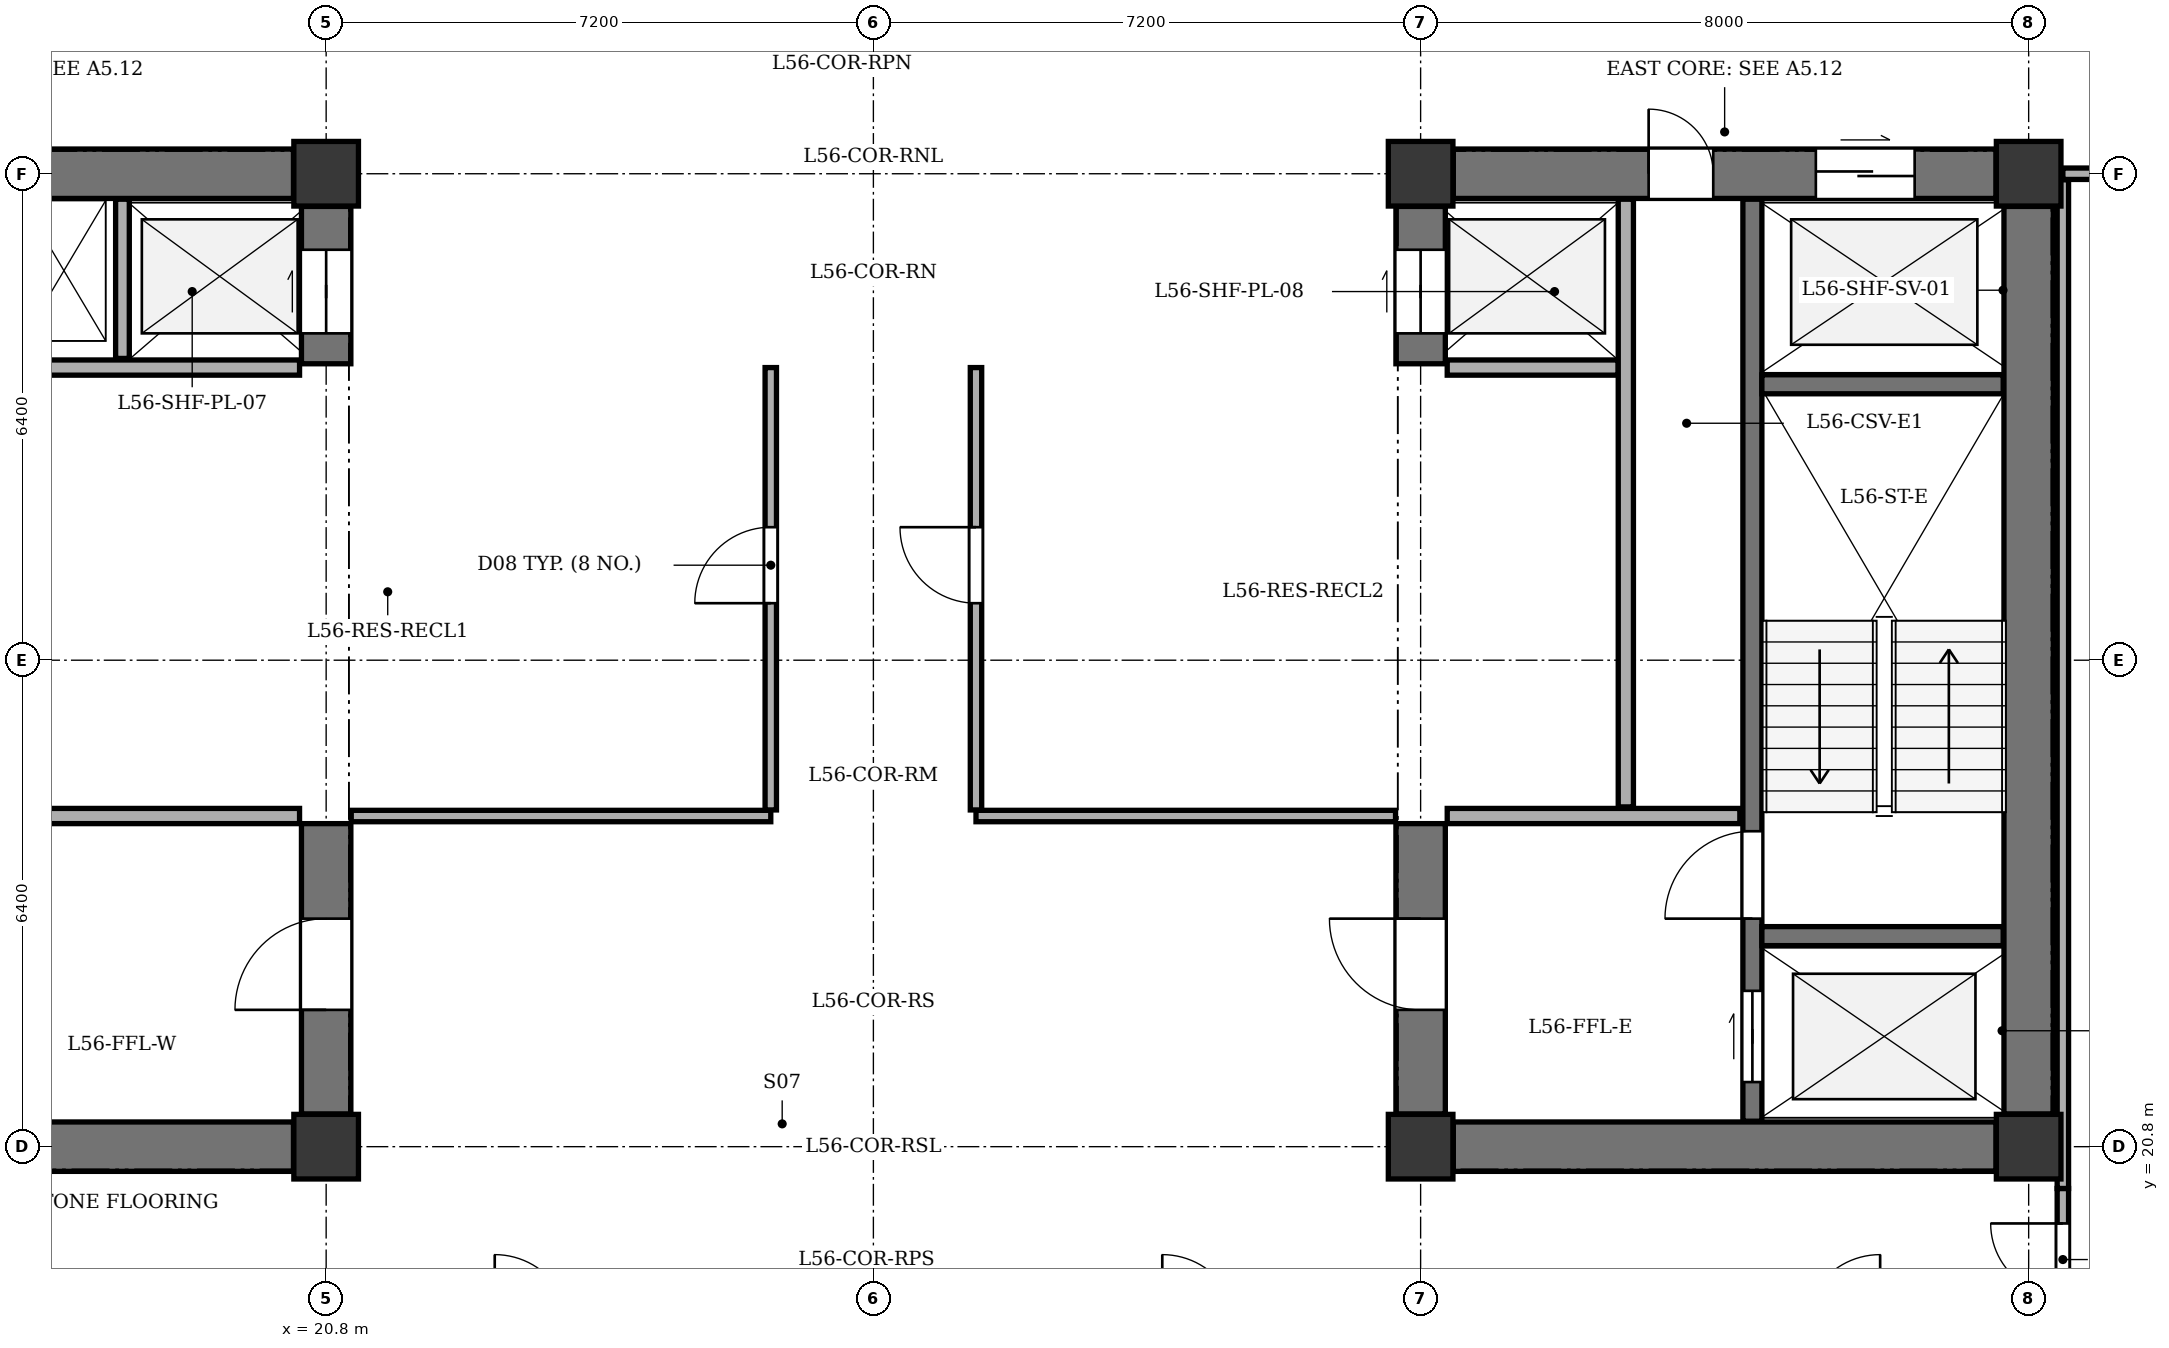
"""IFC4 building model, lengths in metres.
Left out: names, types, materials, properties, quantities, classifications, styles, units other than length and angle.
Written with IfcOpenShell. Run it as: python <this file> out.ifc"""

import sys

from ifc_helpers import new_model, si_unit, direction, frame, frame_2d, origin, origin_2d, place, context, subcontext, project, spatial, rectangle, extrude, element, fill, save


model = new_model("IFC4")
c1 = context("Model", 3, precision=1e-05, world=origin(), true_north=direction((0.0, 1.0)))
c2 = subcontext(c1, "Body", "Model", "MODEL_VIEW")
j1 = project(units=[si_unit("LENGTHUNIT", "METRE"), si_unit("PLANEANGLEUNIT", "RADIAN")], contexts=[c1])
p1 = place(None, origin())
s1 = spatial("IfcSite", under=j1, at=p1, CompositionType="ELEMENT")
p2 = place(p1, origin())
s2 = spatial("IfcBuilding", under=s1, at=p2, CompositionType="ELEMENT")
p3 = place(p2, frame((0.0, 0.0, 217.7)))
s3 = spatial("IfcBuildingStorey", under=s2, at=p3, CompositionType="ELEMENT", Elevation=217.7)
for number, where, z_axis, x_axis in (
    (1, (20.8, 20.8, 0.0), (0.0, 0.0, 1.0), (1.0, 0.0, 0.0)),
    (2, (20.8, 33.6, 0.0), (0.0, 0.0, 1.0), (1.0, 0.0, 0.0)),
    (3, (35.2, 20.8, 0.0), (0.0, 0.0, 1.0), (1.0, 0.0, 0.0)),
    (4, (43.2, 20.8, 0.0), (0.0, 0.0, 1.0), (1.0, 0.0, 0.0)),
    (5, (35.2, 33.6, 0.0), (0.0, 0.0, 1.0), (1.0, 0.0, 0.0)),
    (6, (43.2, 33.6, 0.0), (0.0, 0.0, 1.0), (1.0, 0.0, 0.0)),
):
    element("IfcColumn", number, at=place(p3, frame(where, z_axis=z_axis, x_axis=x_axis)), inside=s3, PredefinedType="COLUMN", context=c2, shape_type="SweptSolid", body=[
        extrude(rectangle(XDim=0.85, YDim=0.85, at=origin_2d()), origin(), (0.0, 0.0, 1.0), 3.4),
    ])
p4 = place(p3, frame((13.23, 20.8, 0.0), z_axis=(0.0, 0.0, 1.0), x_axis=(1.0, 0.0, 0.0)))
e7 = element("IfcWall", 7, at=p4, inside=s3, PredefinedType="SHEAR", context=c2, shape_type="SweptSolid", body=[
    extrude(rectangle(XDim=7.14, YDim=0.65, at=frame_2d((3.57, 0.0))), origin(), (0.0, 0.0, 1.0), 3.1),
])
p5 = place(p3, frame((13.23, 33.6, 0.0), z_axis=(0.0, 0.0, 1.0), x_axis=(1.0, 0.0, 0.0)))
e8 = element("IfcWall", 8, at=p5, inside=s3, PredefinedType="SHEAR", context=c2, shape_type="SweptSolid", body=[
    extrude(rectangle(XDim=7.14, YDim=0.65, at=frame_2d((3.57, 0.0))), origin(), (0.0, 0.0, 1.0), 3.1),
])
p6 = place(p5, frame((1.17, 0.0, 0.0)))
e9 = element("IfcOpeningElement", 9, at=p6, cuts=e8, PredefinedType="OPENING", context=c2, shape_type="SweptSolid", body=[
    extrude(rectangle(XDim=0.85, YDim=2.02, at=frame_2d((0.425, 1.01))), frame((0.0, 0.335, 0.0), z_axis=(0.0, -1.0, 0.0), x_axis=(1.0, 0.0, 0.0)), (0.0, 0.0, 1.0), 0.67),
])
p7 = place(p3, frame((20.8, 21.23, 0.0), z_axis=(0.0, 0.0, 1.0), x_axis=(0.0, 1.0, 0.0)))
e10 = element("IfcWall", 10, at=p7, inside=s3, PredefinedType="SHEAR", context=c2, shape_type="SweptSolid", body=[
    extrude(rectangle(XDim=3.82, YDim=0.65, at=frame_2d((1.91, 0.0))), origin(), (0.0, 0.0, 1.0), 3.1),
])
p8 = place(p7, frame((1.37, 0.0, 0.0)))
e11 = element("IfcOpeningElement", 11, at=p8, cuts=e10, PredefinedType="OPENING", context=c2, shape_type="SweptSolid", body=[
    extrude(rectangle(XDim=1.2, YDim=2.15, at=frame_2d((0.6, 1.075))), frame((0.0, 0.335, 0.0), z_axis=(0.0, -1.0, 0.0), x_axis=(1.0, 0.0, 0.0)), (0.0, 0.0, 1.0), 0.67),
])
p9 = place(p3, frame((20.8, 31.1, 0.0), z_axis=(0.0, 0.0, 1.0), x_axis=(0.0, 1.0, 0.0)))
e12 = element("IfcWall", 12, at=p9, inside=s3, PredefinedType="SHEAR", context=c2, shape_type="SweptSolid", body=[
    extrude(rectangle(XDim=2.07, YDim=0.65, at=frame_2d((1.035, 0.0))), origin(), (0.0, 0.0, 1.0), 3.1),
])
p10 = place(p9, frame((0.4, 0.0, 0.0)))
e13 = element("IfcOpeningElement", 13, at=p10, cuts=e12, PredefinedType="OPENING", context=c2, shape_type="SweptSolid", body=[
    extrude(rectangle(XDim=1.1, YDim=2.1, at=frame_2d((0.55, 1.05))), frame((0.0, 0.335, 0.0), z_axis=(0.0, -1.0, 0.0), x_axis=(1.0, 0.0, 0.0)), (0.0, 0.0, 1.0), 0.67),
])
for number, where, z_axis, x_axis in (
    (14, (16.6, 25.15, 0.0), (0.0, 0.0, 1.0), (1.0, 0.0, 0.0)),
    (15, (16.6, 31.05, 0.0), (0.0, 0.0, 1.0), (1.0, 0.0, 0.0)),
):
    element("IfcWall", number, at=place(p3, frame(where, z_axis=z_axis, x_axis=x_axis)), inside=s3, PredefinedType="SOLIDWALL", context=c2, shape_type="SweptSolid", body=[
        extrude(rectangle(XDim=3.85, YDim=0.2, at=frame_2d((1.925, 0.0))), origin(), (0.0, 0.0, 1.0), 3.1),
    ])
p11 = place(p3, frame((18.12, 31.17, 0.0), z_axis=(0.0, 0.0, 1.0), x_axis=(0.0, 1.0, 0.0)))
e16 = element("IfcWall", 16, at=p11, inside=s3, PredefinedType="PARTITIONING", context=c2, shape_type="SweptSolid", body=[
    extrude(rectangle(XDim=2.095, YDim=0.18, at=frame_2d((1.047, 0.0))), origin(), (0.0, 0.0, 1.0), 3.1),
])
p12 = place(p3, frame((43.2, 21.23, 0.0), z_axis=(0.0, 0.0, 1.0), x_axis=(0.0, 1.0, 0.0)))
e17 = element("IfcWall", 17, at=p12, inside=s3, PredefinedType="SHEAR", context=c2, shape_type="SweptSolid", body=[
    extrude(rectangle(XDim=11.94, YDim=0.65, at=frame_2d((5.97, 0.0))), origin(), (0.0, 0.0, 1.0), 3.1),
])
p13 = place(p3, frame((35.63, 20.8, 0.0), z_axis=(0.0, 0.0, 1.0), x_axis=(1.0, 0.0, 0.0)))
e18 = element("IfcWall", 18, at=p13, inside=s3, PredefinedType="SHEAR", context=c2, shape_type="SweptSolid", body=[
    extrude(rectangle(XDim=7.14, YDim=0.65, at=frame_2d((3.57, 0.0))), origin(), (0.0, 0.0, 1.0), 3.1),
])
p14 = place(p3, frame((35.63, 33.6, 0.0), z_axis=(0.0, 0.0, 1.0), x_axis=(1.0, 0.0, 0.0)))
e19 = element("IfcWall", 19, at=p14, inside=s3, PredefinedType="SHEAR", context=c2, shape_type="SweptSolid", body=[
    extrude(rectangle(XDim=7.14, YDim=0.65, at=frame_2d((3.57, 0.0))), origin(), (0.0, 0.0, 1.0), 3.1),
])
p15 = place(p14, frame((4.77, 0.0, 0.0)))
e20 = element("IfcOpeningElement", 20, at=p15, cuts=e19, PredefinedType="OPENING", context=c2, shape_type="SweptSolid", body=[
    extrude(rectangle(XDim=1.3, YDim=2.15, at=frame_2d((0.65, 1.075))), frame((0.0, 0.335, 0.0), z_axis=(0.0, -1.0, 0.0), x_axis=(1.0, 0.0, 0.0)), (0.0, 0.0, 1.0), 0.67),
])
p16 = place(p14, frame((2.57, 0.0, 0.0)))
e21 = element("IfcOpeningElement", 21, at=p16, cuts=e19, PredefinedType="OPENING", context=c2, shape_type="SweptSolid", body=[
    extrude(rectangle(XDim=0.85, YDim=2.02, at=frame_2d((0.425, 1.01))), frame((0.0, 0.335, 0.0), z_axis=(0.0, -1.0, 0.0), x_axis=(1.0, 0.0, 0.0)), (0.0, 0.0, 1.0), 0.67),
])
p17 = place(p3, frame((35.2, 21.23, 0.0), z_axis=(0.0, 0.0, 1.0), x_axis=(0.0, 1.0, 0.0)))
e22 = element("IfcWall", 22, at=p17, inside=s3, PredefinedType="SHEAR", context=c2, shape_type="SweptSolid", body=[
    extrude(rectangle(XDim=3.82, YDim=0.65, at=frame_2d((1.91, 0.0))), origin(), (0.0, 0.0, 1.0), 3.1),
])
p18 = place(p17, frame((1.37, 0.0, 0.0)))
e23 = element("IfcOpeningElement", 23, at=p18, cuts=e22, PredefinedType="OPENING", context=c2, shape_type="SweptSolid", body=[
    extrude(rectangle(XDim=1.2, YDim=2.15, at=frame_2d((0.6, 1.075))), frame((0.0, 0.335, 0.0), z_axis=(0.0, -1.0, 0.0), x_axis=(1.0, 0.0, 0.0)), (0.0, 0.0, 1.0), 0.67),
])
p19 = place(p3, frame((35.2, 31.1, 0.0), z_axis=(0.0, 0.0, 1.0), x_axis=(0.0, 1.0, 0.0)))
e24 = element("IfcWall", 24, at=p19, inside=s3, PredefinedType="SHEAR", context=c2, shape_type="SweptSolid", body=[
    extrude(rectangle(XDim=2.07, YDim=0.65, at=frame_2d((1.035, 0.0))), origin(), (0.0, 0.0, 1.0), 3.1),
])
p20 = place(p19, frame((0.4, 0.0, 0.0)))
e25 = element("IfcOpeningElement", 25, at=p20, cuts=e24, PredefinedType="OPENING", context=c2, shape_type="SweptSolid", body=[
    extrude(rectangle(XDim=1.1, YDim=2.1, at=frame_2d((0.55, 1.05))), frame((0.0, 0.335, 0.0), z_axis=(0.0, -1.0, 0.0), x_axis=(1.0, 0.0, 0.0)), (0.0, 0.0, 1.0), 0.67),
])
p21 = place(p3, frame((39.565, 21.135, 0.0), z_axis=(0.0, 0.0, 1.0), x_axis=(0.0, 1.0, 0.0)))
e26 = element("IfcWall", 26, at=p21, inside=s3, PredefinedType="SHEAR", context=c2, shape_type="SweptSolid", body=[
    extrude(rectangle(XDim=12.13, YDim=0.25, at=frame_2d((6.065, 0.0))), origin(), (0.0, 0.0, 1.0), 3.1),
])
p22 = place(p21, frame((0.515, 0.0, 0.0)))
e27 = element("IfcOpeningElement", 27, at=p22, cuts=e26, PredefinedType="OPENING", context=c2, shape_type="SweptSolid", body=[
    extrude(rectangle(XDim=1.2, YDim=2.15, at=frame_2d((0.6, 1.075))), frame((0.0, 0.135, 0.0), z_axis=(0.0, -1.0, 0.0), x_axis=(1.0, 0.0, 0.0)), (0.0, 0.0, 1.0), 0.27),
])
p23 = place(p21, frame((2.665, 0.0, 0.0)))
e28 = element("IfcOpeningElement", 28, at=p23, cuts=e26, PredefinedType="OPENING", context=c2, shape_type="SweptSolid", body=[
    extrude(rectangle(XDim=1.15, YDim=2.15, at=frame_2d((0.575, 1.075))), frame((0.0, 0.135, 0.0), z_axis=(0.0, -1.0, 0.0), x_axis=(1.0, 0.0, 0.0)), (0.0, 0.0, 1.0), 0.27),
])
for number, where, z_axis, x_axis in (
    (29, (39.69, 23.57, 0.0), (0.0, 0.0, 1.0), (1.0, 0.0, 0.0)),
    (30, (39.69, 30.83, 0.0), (0.0, 0.0, 1.0), (1.0, 0.0, 0.0)),
):
    element("IfcWall", number, at=place(p3, frame(where, z_axis=z_axis, x_axis=x_axis)), inside=s3, PredefinedType="SHEAR", context=c2, shape_type="SweptSolid", body=[
        extrude(rectangle(XDim=3.175, YDim=0.25, at=frame_2d((1.587, 0.0))), origin(), (0.0, 0.0, 1.0), 3.1),
    ])
p24 = place(p3, frame((35.55, 25.15, 0.0), z_axis=(0.0, 0.0, 1.0), x_axis=(1.0, 0.0, 0.0)))
e31 = element("IfcWall", 31, at=p24, inside=s3, PredefinedType="SOLIDWALL", context=c2, shape_type="SweptSolid", body=[
    extrude(rectangle(XDim=3.85, YDim=0.2, at=frame_2d((1.925, 0.0))), origin(), (0.0, 0.0, 1.0), 3.1),
])
p25 = place(p3, frame((35.55, 31.05, 0.0), z_axis=(0.0, 0.0, 1.0), x_axis=(1.0, 0.0, 0.0)))
e32 = element("IfcWall", 32, at=p25, inside=s3, PredefinedType="SOLIDWALL", context=c2, shape_type="SweptSolid", body=[
    extrude(rectangle(XDim=2.25, YDim=0.2, at=frame_2d((1.125, 0.0))), origin(), (0.0, 0.0, 1.0), 3.1),
])
p26 = place(p3, frame((37.9, 25.27, 0.0), z_axis=(0.0, 0.0, 1.0), x_axis=(0.0, 1.0, 0.0)))
e33 = element("IfcWall", 33, at=p26, inside=s3, PredefinedType="SOLIDWALL", context=c2, shape_type="SweptSolid", body=[
    extrude(rectangle(XDim=7.995, YDim=0.2, at=frame_2d((3.998, 0.0))), origin(), (0.0, 0.0, 1.0), 3.1),
])
for number, where, z_axis, x_axis in (
    (34, (21.13, 25.15, 0.0), (0.0, 0.0, 1.0), (1.0, 0.0, 0.0)),
    (35, (29.35, 25.15, 0.0), (0.0, 0.0, 1.0), (1.0, 0.0, 0.0)),
):
    element("IfcWall", number, at=place(p3, frame(where, z_axis=z_axis, x_axis=x_axis)), inside=s3, PredefinedType="PARTITIONING", context=c2, shape_type="SweptSolid", body=[
        extrude(rectangle(XDim=5.52, YDim=0.15, at=frame_2d((2.76, 0.0))), origin(), (0.0, 0.0, 1.0), 3.1),
    ])
p27 = place(p3, frame((26.65, 25.23, 0.0), z_axis=(0.0, 0.0, 1.0), x_axis=(0.0, 1.0, 0.0)))
e36 = element("IfcWall", 36, at=p27, inside=s3, PredefinedType="PARTITIONING", context=c2, shape_type="SweptSolid", body=[
    extrude(rectangle(XDim=5.82, YDim=0.15, at=frame_2d((2.91, 0.0))), origin(), (0.0, 0.0, 1.0), 3.1),
])
p28 = place(p27, frame((2.72, 0.0, 0.0)))
e37 = element("IfcOpeningElement", 37, at=p28, cuts=e36, PredefinedType="OPENING", context=c2, shape_type="SweptSolid", body=[
    extrude(rectangle(XDim=1.0, YDim=2.1, at=frame_2d((0.5, 1.05))), frame((0.0, 0.085, 0.0), z_axis=(0.0, -1.0, 0.0), x_axis=(1.0, 0.0, 0.0)), (0.0, 0.0, 1.0), 0.17),
])
p29 = place(p3, frame((29.35, 25.23, 0.0), z_axis=(0.0, 0.0, 1.0), x_axis=(0.0, 1.0, 0.0)))
e38 = element("IfcWall", 38, at=p29, inside=s3, PredefinedType="PARTITIONING", context=c2, shape_type="SweptSolid", body=[
    extrude(rectangle(XDim=5.82, YDim=0.15, at=frame_2d((2.91, 0.0))), origin(), (0.0, 0.0, 1.0), 3.1),
])
p30 = place(p29, frame((2.72, 0.0, 0.0)))
e39 = element("IfcOpeningElement", 39, at=p30, cuts=e38, PredefinedType="OPENING", context=c2, shape_type="SweptSolid", body=[
    extrude(rectangle(XDim=1.0, YDim=2.1, at=frame_2d((0.5, 1.05))), frame((0.0, 0.085, 0.0), z_axis=(0.0, -1.0, 0.0), x_axis=(1.0, 0.0, 0.0)), (0.0, 0.0, 1.0), 0.17),
])
p31 = place(p3, frame((43.65, 33.6, 0.0), z_axis=(0.0, 0.0, 1.0), x_axis=(1.0, 0.0, 0.0)))
e40 = element("IfcWall", 40, at=p31, inside=s3, PredefinedType="PARTITIONING", context=c2, shape_type="SweptSolid", body=[
    extrude(rectangle(XDim=5.305, YDim=0.15, at=frame_2d((2.653, 0.0))), origin(), (0.0, 0.0, 1.0), 2.535),
])
p32 = place(p3, frame((43.65, 18.46, 0.0), z_axis=(0.0, 0.0, 1.0), x_axis=(0.0, 1.0, 0.0)))
e41 = element("IfcWall", 41, at=p32, inside=s3, PredefinedType="PARTITIONING", context=c2, shape_type="SweptSolid", body=[
    extrude(rectangle(XDim=1.79, YDim=0.15, at=frame_2d((0.895, 0.0))), origin(), (0.0, 0.0, 1.0), 3.1),
])
p33 = place(p32, frame((0.38, 0.0, 0.0)))
e42 = element("IfcOpeningElement", 42, at=p33, cuts=e41, PredefinedType="OPENING", context=c2, shape_type="SweptSolid", body=[
    extrude(rectangle(XDim=0.95, YDim=2.1, at=frame_2d((0.475, 1.05))), frame((0.0, 0.085, 0.0), z_axis=(0.0, -1.0, 0.0), x_axis=(1.0, 0.0, 0.0)), (0.0, 0.0, 1.0), 0.17),
])
p34 = place(p3, frame((43.65, 20.25, 0.0), z_axis=(0.0, 0.0, 1.0), x_axis=(0.0, 1.0, 0.0)))
e43 = element("IfcWall", 43, at=p34, inside=s3, PredefinedType="PARTITIONING", context=c2, shape_type="SweptSolid", body=[
    extrude(rectangle(XDim=13.27, YDim=0.15, at=frame_2d((6.635, 0.0))), origin(), (0.0, 0.0, 1.0), 3.1),
])
p35 = place(p8, origin())
e44 = element("IfcDoor", 44, at=p35, inside=s3, OperationType="SINGLE_SWING_LEFT", PredefinedType="DOOR", context=c2, shape_type="SweptSolid", body=[
    extrude(rectangle(XDim=1.2, YDim=2.15, at=frame_2d((0.6, 1.075))), frame((0.0, 0.025, 0.0), z_axis=(0.0, -1.0, 0.0), x_axis=(1.0, 0.0, 0.0)), (0.0, 0.0, 1.0), 0.05),
])
fill(e11, e44)
p36 = place(p10, origin())
e45 = element("IfcDoor", 45, at=p36, inside=s3, OperationType="DOUBLE_DOOR_SLIDING", PredefinedType="DOOR", context=c2, shape_type="SweptSolid", body=[
    extrude(rectangle(XDim=1.1, YDim=2.1, at=frame_2d((0.55, 1.05))), frame((0.0, 0.025, 0.0), z_axis=(0.0, -1.0, 0.0), x_axis=(1.0, 0.0, 0.0)), (0.0, 0.0, 1.0), 0.05),
])
fill(e13, e45)
p37 = place(p15, origin())
e46 = element("IfcDoor", 46, at=p37, inside=s3, OperationType="DOUBLE_DOOR_SLIDING", PredefinedType="DOOR", context=c2, shape_type="SweptSolid", body=[
    extrude(rectangle(XDim=1.3, YDim=2.15, at=frame_2d((0.65, 1.075))), frame((0.0, 0.025, 0.0), z_axis=(0.0, -1.0, 0.0), x_axis=(1.0, 0.0, 0.0)), (0.0, 0.0, 1.0), 0.05),
])
fill(e20, e46)
p38 = place(p16, origin())
e47 = element("IfcDoor", 47, at=p38, inside=s3, OperationType="SINGLE_SWING_LEFT", PredefinedType="DOOR", context=c2, shape_type="SweptSolid", body=[
    extrude(rectangle(XDim=0.85, YDim=2.02, at=frame_2d((0.425, 1.01))), frame((0.0, 0.025, 0.0), z_axis=(0.0, -1.0, 0.0), x_axis=(1.0, 0.0, 0.0)), (0.0, 0.0, 1.0), 0.05),
])
fill(e21, e47)
p39 = place(p18, origin())
e48 = element("IfcDoor", 48, at=p39, inside=s3, OperationType="SINGLE_SWING_RIGHT", PredefinedType="DOOR", context=c2, shape_type="SweptSolid", body=[
    extrude(rectangle(XDim=1.2, YDim=2.15, at=frame_2d((0.6, 1.075))), frame((0.0, 0.025, 0.0), z_axis=(0.0, -1.0, 0.0), x_axis=(1.0, 0.0, 0.0)), (0.0, 0.0, 1.0), 0.05),
])
fill(e23, e48)
p40 = place(p20, origin())
e49 = element("IfcDoor", 49, at=p40, inside=s3, OperationType="DOUBLE_DOOR_SLIDING", PredefinedType="DOOR", context=c2, shape_type="SweptSolid", body=[
    extrude(rectangle(XDim=1.1, YDim=2.1, at=frame_2d((0.55, 1.05))), frame((0.0, 0.025, 0.0), z_axis=(0.0, -1.0, 0.0), x_axis=(1.0, 0.0, 0.0)), (0.0, 0.0, 1.0), 0.05),
])
fill(e25, e49)
p41 = place(p22, origin())
e50 = element("IfcDoor", 50, at=p41, inside=s3, OperationType="DOUBLE_DOOR_SLIDING", PredefinedType="DOOR", context=c2, shape_type="SweptSolid", body=[
    extrude(rectangle(XDim=1.2, YDim=2.15, at=frame_2d((0.6, 1.075))), frame((0.0, 0.025, 0.0), z_axis=(0.0, -1.0, 0.0), x_axis=(1.0, 0.0, 0.0)), (0.0, 0.0, 1.0), 0.05),
])
fill(e27, e50)
p42 = place(p23, origin())
e51 = element("IfcDoor", 51, at=p42, inside=s3, OperationType="SINGLE_SWING_LEFT", PredefinedType="DOOR", context=c2, shape_type="SweptSolid", body=[
    extrude(rectangle(XDim=1.15, YDim=2.15, at=frame_2d((0.575, 1.075))), frame((0.0, 0.025, 0.0), z_axis=(0.0, -1.0, 0.0), x_axis=(1.0, 0.0, 0.0)), (0.0, 0.0, 1.0), 0.05),
])
fill(e28, e51)
p43 = place(p28, origin())
e52 = element("IfcDoor", 52, at=p43, inside=s3, OperationType="SINGLE_SWING_LEFT", PredefinedType="DOOR", context=c2, shape_type="SweptSolid", body=[
    extrude(rectangle(XDim=1.0, YDim=2.1, at=frame_2d((0.5, 1.05))), frame((0.0, 0.025, 0.0), z_axis=(0.0, -1.0, 0.0), x_axis=(1.0, 0.0, 0.0)), (0.0, 0.0, 1.0), 0.05),
])
fill(e37, e52)
p44 = place(p30, origin())
e53 = element("IfcDoor", 53, at=p44, inside=s3, OperationType="SINGLE_SWING_RIGHT", PredefinedType="DOOR", context=c2, shape_type="SweptSolid", body=[
    extrude(rectangle(XDim=1.0, YDim=2.1, at=frame_2d((0.5, 1.05))), frame((0.0, 0.025, 0.0), z_axis=(0.0, -1.0, 0.0), x_axis=(1.0, 0.0, 0.0)), (0.0, 0.0, 1.0), 0.05),
])
fill(e39, e53)
p45 = place(p33, origin())
e54 = element("IfcDoor", 54, at=p45, inside=s3, OperationType="SINGLE_SWING_RIGHT", PredefinedType="DOOR", context=c2, shape_type="SweptSolid", body=[
    extrude(rectangle(XDim=0.95, YDim=2.1, at=frame_2d((0.475, 1.05))), frame((0.0, 0.025, 0.0), z_axis=(0.0, -1.0, 0.0), x_axis=(1.0, 0.0, 0.0)), (0.0, 0.0, 1.0), 0.05),
])
fill(e42, e54)
save(model, sys.argv[1])
